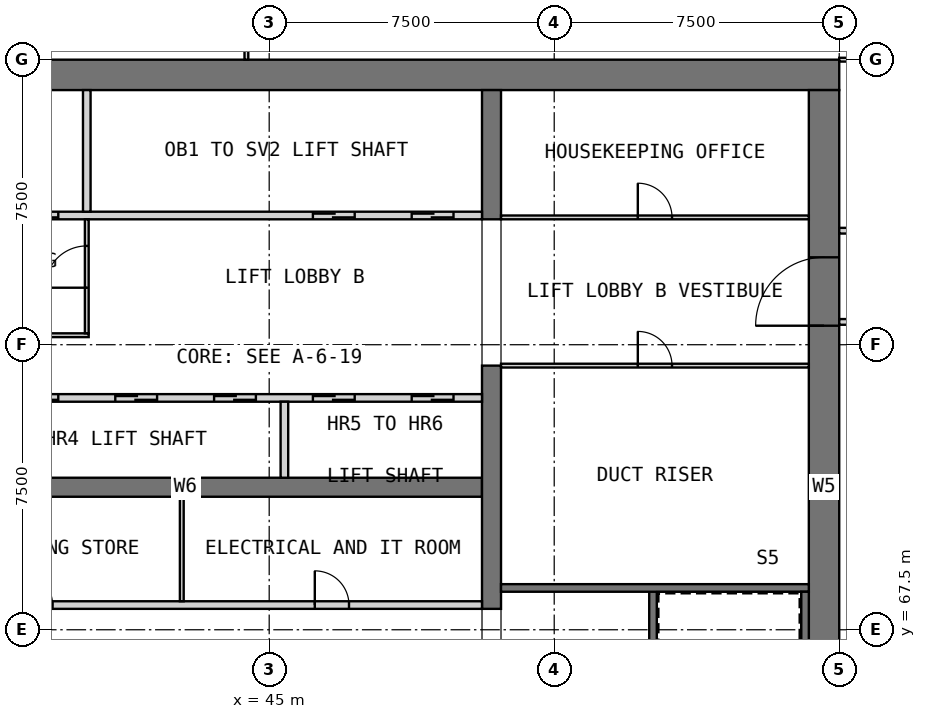
"""IFC4 building model, lengths in metres.
Left out: names, types, materials, properties, quantities, classifications, styles, units other than length and angle.
Written with IfcOpenShell. Run it as: python <this file> out.ifc"""

import sys

from ifc_helpers import new_model, si_unit, direction, frame, frame_2d, origin, place, context, subcontext, project, spatial, rectangle, extrude, element, fill, save


model = new_model("IFC4")
c1 = context("Model", 3, precision=1e-05, world=origin(), true_north=direction((0.0, 1.0)))
c2 = subcontext(c1, "Body", "Model", "MODEL_VIEW")
j1 = project(units=[si_unit("LENGTHUNIT", "METRE"), si_unit("PLANEANGLEUNIT", "RADIAN")], contexts=[c1])
p1 = place(None, origin())
s1 = spatial("IfcSite", under=j1, at=p1, CompositionType="ELEMENT")
p2 = place(p1, origin())
s2 = spatial("IfcBuilding", under=s1, at=p2, CompositionType="ELEMENT")
p3 = place(p2, frame((0.0, 0.0, 137.4)))
s3 = spatial("IfcBuildingStorey", under=s2, at=p3, CompositionType="ELEMENT", Elevation=137.4)
p4 = place(p3, frame((30.0, 82.1, 0.0), z_axis=(0.0, 0.0, 1.0), x_axis=(1.0, 0.0, 0.0)))
e1 = element("IfcWall", 1, at=p4, inside=s3, PredefinedType="SHEAR", context=c2, shape_type="SweptSolid", body=[
    extrude(rectangle(XDim=30.0, YDim=0.8, at=frame_2d((15.0, 0.0))), origin(), (0.0, 0.0, 1.0), 3.6),
])
p5 = place(p3, frame((59.6, 60.8, 0.0), z_axis=(0.0, 0.0, 1.0), x_axis=(0.0, 1.0, 0.0)))
e2 = element("IfcWall", 2, at=p5, inside=s3, PredefinedType="SHEAR", context=c2, shape_type="SweptSolid", body=[
    extrude(rectangle(XDim=20.9, YDim=0.8, at=frame_2d((10.45, 0.0))), origin(), (0.0, 0.0, 1.0), 3.6),
])
p6 = place(p5, frame((14.7, 0.0, 0.0)))
e3 = element("IfcOpeningElement", 3, at=p6, cuts=e2, PredefinedType="OPENING", context=c2, shape_type="SweptSolid", body=[
    extrude(rectangle(XDim=1.8, YDim=2.1, at=frame_2d((0.9, 1.05))), frame((0.0, 0.41, 0.0), z_axis=(0.0, -1.0, 0.0), x_axis=(1.0, 0.0, 0.0)), (0.0, 0.0, 1.0), 0.82),
])
p7 = place(p3, frame((35.0, 71.25, 0.0), z_axis=(0.0, 0.0, 1.0), x_axis=(1.0, 0.0, 0.0)))
e4 = element("IfcWall", 4, at=p7, inside=s3, PredefinedType="SHEAR", context=c2, shape_type="SweptSolid", body=[
    extrude(rectangle(XDim=15.6, YDim=0.5, at=frame_2d((7.8, 0.0))), origin(), (0.0, 0.0, 1.0), 3.6),
])
p8 = place(p3, frame((50.85, 68.05, 0.0), z_axis=(0.0, 0.0, 1.0), x_axis=(0.0, 1.0, 0.0)))
e5 = element("IfcWall", 5, at=p8, inside=s3, PredefinedType="SHEAR", context=c2, shape_type="SweptSolid", body=[
    extrude(rectangle(XDim=6.4, YDim=0.5, at=frame_2d((3.2, 0.0))), origin(), (0.0, 0.0, 1.0), 3.6),
])
p9 = place(p3, frame((50.85, 78.3, 0.0), z_axis=(0.0, 0.0, 1.0), x_axis=(0.0, 1.0, 0.0)))
e6 = element("IfcWall", 6, at=p9, inside=s3, PredefinedType="SHEAR", context=c2, shape_type="SweptSolid", body=[
    extrude(rectangle(XDim=3.4, YDim=0.5, at=frame_2d((1.7, 0.0))), origin(), (0.0, 0.0, 1.0), 3.6),
])
p10 = place(p3, frame((35.0, 68.15, 0.0), z_axis=(0.0, 0.0, 1.0), x_axis=(1.0, 0.0, 0.0)))
e7 = element("IfcWall", 7, at=p10, inside=s3, PredefinedType="PARTITIONING", context=c2, shape_type="SweptSolid", body=[
    extrude(rectangle(XDim=15.6, YDim=0.2, at=frame_2d((7.8, 0.0))), origin(), (0.0, 0.0, 1.0), 3.35),
])
p11 = place(p10, frame((3.4, 0.0, 0.0)))
e8 = element("IfcOpeningElement", 8, at=p11, cuts=e7, PredefinedType="OPENING", context=c2, shape_type="SweptSolid", body=[
    extrude(rectangle(XDim=0.9, YDim=2.1, at=frame_2d((0.45, 1.05))), frame((0.0, 0.11, 0.0), z_axis=(0.0, -1.0, 0.0), x_axis=(1.0, 0.0, 0.0)), (0.0, 0.0, 1.0), 0.22),
])
p12 = place(p10, frame((11.2, 0.0, 0.0)))
e9 = element("IfcOpeningElement", 9, at=p12, cuts=e7, PredefinedType="OPENING", context=c2, shape_type="SweptSolid", body=[
    extrude(rectangle(XDim=0.9, YDim=2.1, at=frame_2d((0.45, 1.05))), frame((0.0, 0.11, 0.0), z_axis=(0.0, -1.0, 0.0), x_axis=(1.0, 0.0, 0.0)), (0.0, 0.0, 1.0), 0.22),
])
p13 = place(p3, frame((42.7, 68.25, 0.0), z_axis=(0.0, 0.0, 1.0), x_axis=(0.0, 1.0, 0.0)))
e10 = element("IfcWall", 10, at=p13, inside=s3, PredefinedType="PARTITIONING", context=c2, shape_type="SweptSolid", body=[
    extrude(rectangle(XDim=2.75, YDim=0.1, at=frame_2d((1.375, 0.0))), origin(), (0.0, 0.0, 1.0), 3.35),
])
p14 = place(p3, frame((35.0, 73.6, 0.0), z_axis=(0.0, 0.0, 1.0), x_axis=(1.0, 0.0, 0.0)))
e11 = element("IfcWall", 11, at=p14, inside=s3, PredefinedType="SOLIDWALL", context=c2, shape_type="SweptSolid", body=[
    extrude(rectangle(XDim=15.6, YDim=0.2, at=frame_2d((7.8, 0.0))), origin(), (0.0, 0.0, 1.0), 3.6),
])
p15 = place(p14, frame((0.75, 0.0, 0.0)))
e12 = element("IfcOpeningElement", 12, at=p15, cuts=e11, PredefinedType="OPENING", context=c2, shape_type="SweptSolid", body=[
    extrude(rectangle(XDim=1.1, YDim=2.1, at=frame_2d((0.55, 1.05))), frame((0.0, 0.11, 0.0), z_axis=(0.0, -1.0, 0.0), x_axis=(1.0, 0.0, 0.0)), (0.0, 0.0, 1.0), 0.22),
])
p16 = place(p14, frame((3.35, 0.0, 0.0)))
e13 = element("IfcOpeningElement", 13, at=p16, cuts=e11, PredefinedType="OPENING", context=c2, shape_type="SweptSolid", body=[
    extrude(rectangle(XDim=1.1, YDim=2.1, at=frame_2d((0.55, 1.05))), frame((0.0, 0.11, 0.0), z_axis=(0.0, -1.0, 0.0), x_axis=(1.0, 0.0, 0.0)), (0.0, 0.0, 1.0), 0.22),
])
p17 = place(p14, frame((5.95, 0.0, 0.0)))
e14 = element("IfcOpeningElement", 14, at=p17, cuts=e11, PredefinedType="OPENING", context=c2, shape_type="SweptSolid", body=[
    extrude(rectangle(XDim=1.1, YDim=2.1, at=frame_2d((0.55, 1.05))), frame((0.0, 0.11, 0.0), z_axis=(0.0, -1.0, 0.0), x_axis=(1.0, 0.0, 0.0)), (0.0, 0.0, 1.0), 0.22),
])
p18 = place(p14, frame((8.55, 0.0, 0.0)))
e15 = element("IfcOpeningElement", 15, at=p18, cuts=e11, PredefinedType="OPENING", context=c2, shape_type="SweptSolid", body=[
    extrude(rectangle(XDim=1.1, YDim=2.1, at=frame_2d((0.55, 1.05))), frame((0.0, 0.11, 0.0), z_axis=(0.0, -1.0, 0.0), x_axis=(1.0, 0.0, 0.0)), (0.0, 0.0, 1.0), 0.22),
])
p19 = place(p14, frame((11.15, 0.0, 0.0)))
e16 = element("IfcOpeningElement", 16, at=p19, cuts=e11, PredefinedType="OPENING", context=c2, shape_type="SweptSolid", body=[
    extrude(rectangle(XDim=1.1, YDim=2.1, at=frame_2d((0.55, 1.05))), frame((0.0, 0.11, 0.0), z_axis=(0.0, -1.0, 0.0), x_axis=(1.0, 0.0, 0.0)), (0.0, 0.0, 1.0), 0.22),
])
p20 = place(p14, frame((13.75, 0.0, 0.0)))
e17 = element("IfcOpeningElement", 17, at=p20, cuts=e11, PredefinedType="OPENING", context=c2, shape_type="SweptSolid", body=[
    extrude(rectangle(XDim=1.1, YDim=2.1, at=frame_2d((0.55, 1.05))), frame((0.0, 0.11, 0.0), z_axis=(0.0, -1.0, 0.0), x_axis=(1.0, 0.0, 0.0)), (0.0, 0.0, 1.0), 0.22),
])
p21 = place(p3, frame((45.4, 71.5, 0.0), z_axis=(0.0, 0.0, 1.0), x_axis=(0.0, 1.0, 0.0)))
e18 = element("IfcWall", 18, at=p21, inside=s3, PredefinedType="SOLIDWALL", context=c2, shape_type="SweptSolid", body=[
    extrude(rectangle(XDim=2.0, YDim=0.2, at=frame_2d((1.0, 0.0))), origin(), (0.0, 0.0, 1.0), 3.6),
])
p22 = place(p3, frame((35.0, 78.4, 0.0), z_axis=(0.0, 0.0, 1.0), x_axis=(1.0, 0.0, 0.0)))
e19 = element("IfcWall", 19, at=p22, inside=s3, PredefinedType="SOLIDWALL", context=c2, shape_type="SweptSolid", body=[
    extrude(rectangle(XDim=15.6, YDim=0.2, at=frame_2d((7.8, 0.0))), origin(), (0.0, 0.0, 1.0), 3.6),
])
p23 = place(p22, frame((0.75, 0.0, 0.0)))
e20 = element("IfcOpeningElement", 20, at=p23, cuts=e19, PredefinedType="OPENING", context=c2, shape_type="SweptSolid", body=[
    extrude(rectangle(XDim=1.1, YDim=2.1, at=frame_2d((0.55, 1.05))), frame((0.0, 0.11, 0.0), z_axis=(0.0, -1.0, 0.0), x_axis=(1.0, 0.0, 0.0)), (0.0, 0.0, 1.0), 0.22),
])
p24 = place(p22, frame((3.35, 0.0, 0.0)))
e21 = element("IfcOpeningElement", 21, at=p24, cuts=e19, PredefinedType="OPENING", context=c2, shape_type="SweptSolid", body=[
    extrude(rectangle(XDim=1.1, YDim=2.1, at=frame_2d((0.55, 1.05))), frame((0.0, 0.11, 0.0), z_axis=(0.0, -1.0, 0.0), x_axis=(1.0, 0.0, 0.0)), (0.0, 0.0, 1.0), 0.22),
])
p25 = place(p22, frame((11.15, 0.0, 0.0)))
e22 = element("IfcOpeningElement", 22, at=p25, cuts=e19, PredefinedType="OPENING", context=c2, shape_type="SweptSolid", body=[
    extrude(rectangle(XDim=1.1, YDim=2.1, at=frame_2d((0.55, 1.05))), frame((0.0, 0.11, 0.0), z_axis=(0.0, -1.0, 0.0), x_axis=(1.0, 0.0, 0.0)), (0.0, 0.0, 1.0), 0.22),
])
p26 = place(p22, frame((13.75, 0.0, 0.0)))
e23 = element("IfcOpeningElement", 23, at=p26, cuts=e19, PredefinedType="OPENING", context=c2, shape_type="SweptSolid", body=[
    extrude(rectangle(XDim=1.1, YDim=2.1, at=frame_2d((0.55, 1.05))), frame((0.0, 0.11, 0.0), z_axis=(0.0, -1.0, 0.0), x_axis=(1.0, 0.0, 0.0)), (0.0, 0.0, 1.0), 0.22),
])
p27 = place(p3, frame((40.2, 78.5, 0.0), z_axis=(0.0, 0.0, 1.0), x_axis=(0.0, 1.0, 0.0)))
e24 = element("IfcWall", 24, at=p27, inside=s3, PredefinedType="SOLIDWALL", context=c2, shape_type="SweptSolid", body=[
    extrude(rectangle(XDim=3.2, YDim=0.2, at=frame_2d((1.6, 0.0))), origin(), (0.0, 0.0, 1.0), 3.6),
])
p28 = place(p3, frame((35.0, 75.25, 0.0), z_axis=(0.0, 0.0, 1.0), x_axis=(1.0, 0.0, 0.0)))
e25 = element("IfcWall", 25, at=p28, inside=s3, PredefinedType="PARTITIONING", context=c2, shape_type="SweptSolid", body=[
    extrude(rectangle(XDim=5.25, YDim=0.1, at=frame_2d((2.625, 0.0))), origin(), (0.0, 0.0, 1.0), 3.35),
])
p29 = place(p3, frame((40.2, 75.3, 0.0), z_axis=(0.0, 0.0, 1.0), x_axis=(0.0, 1.0, 0.0)))
e26 = element("IfcWall", 26, at=p29, inside=s3, PredefinedType="PARTITIONING", context=c2, shape_type="SweptSolid", body=[
    extrude(rectangle(XDim=3.0, YDim=0.1, at=frame_2d((1.5, 0.0))), origin(), (0.0, 0.0, 1.0), 3.35),
])
p30 = place(p29, frame((1.2, 0.0, 0.0)))
e27 = element("IfcOpeningElement", 27, at=p30, cuts=e26, PredefinedType="OPENING", context=c2, shape_type="SweptSolid", body=[
    extrude(rectangle(XDim=1.1, YDim=2.1, at=frame_2d((0.55, 1.05))), frame((0.0, 0.06, 0.0), z_axis=(0.0, -1.0, 0.0), x_axis=(1.0, 0.0, 0.0)), (0.0, 0.0, 1.0), 0.12),
])
p31 = place(p3, frame((55.1, 60.8, 0.0), z_axis=(0.0, 0.0, 1.0), x_axis=(0.0, 1.0, 0.0)))
e28 = element("IfcWall", 28, at=p31, inside=s3, PredefinedType="SOLIDWALL", context=c2, shape_type="SweptSolid", body=[
    extrude(rectangle(XDim=7.8, YDim=0.2, at=frame_2d((3.9, 0.0))), origin(), (0.0, 0.0, 1.0), 3.35),
])
p32 = place(p3, frame((51.1, 68.6, 0.0), z_axis=(0.0, 0.0, 1.0), x_axis=(1.0, 0.0, 0.0)))
e29 = element("IfcWall", 29, at=p32, inside=s3, PredefinedType="SOLIDWALL", context=c2, shape_type="SweptSolid", body=[
    extrude(rectangle(XDim=8.1, YDim=0.2, at=frame_2d((4.05, 0.0))), origin(), (0.0, 0.0, 1.0), 3.35),
])
p33 = place(p3, frame((59.1, 60.8, 0.0), z_axis=(0.0, 0.0, 1.0), x_axis=(0.0, 1.0, 0.0)))
e30 = element("IfcWall", 30, at=p33, inside=s3, PredefinedType="SOLIDWALL", context=c2, shape_type="SweptSolid", body=[
    extrude(rectangle(XDim=7.7, YDim=0.2, at=frame_2d((3.85, 0.0))), origin(), (0.0, 0.0, 1.0), 3.35),
])
p34 = place(p3, frame((51.1, 74.45, 0.0), z_axis=(0.0, 0.0, 1.0), x_axis=(1.0, 0.0, 0.0)))
e31 = element("IfcWall", 31, at=p34, inside=s3, PredefinedType="PARTITIONING", context=c2, shape_type="SweptSolid", body=[
    extrude(rectangle(XDim=8.1, YDim=0.1, at=frame_2d((4.05, 0.0))), origin(), (0.0, 0.0, 1.0), 3.35),
])
p35 = place(p34, frame((3.6, 0.0, 0.0)))
e32 = element("IfcOpeningElement", 32, at=p35, cuts=e31, PredefinedType="OPENING", context=c2, shape_type="SweptSolid", body=[
    extrude(rectangle(XDim=0.9, YDim=2.1, at=frame_2d((0.45, 1.05))), frame((0.0, 0.06, 0.0), z_axis=(0.0, -1.0, 0.0), x_axis=(1.0, 0.0, 0.0)), (0.0, 0.0, 1.0), 0.12),
])
p36 = place(p3, frame((51.1, 78.35, 0.0), z_axis=(0.0, 0.0, 1.0), x_axis=(1.0, 0.0, 0.0)))
e33 = element("IfcWall", 33, at=p36, inside=s3, PredefinedType="PARTITIONING", context=c2, shape_type="SweptSolid", body=[
    extrude(rectangle(XDim=8.1, YDim=0.1, at=frame_2d((4.05, 0.0))), origin(), (0.0, 0.0, 1.0), 3.35),
])
p37 = place(p36, frame((3.6, 0.0, 0.0)))
e34 = element("IfcOpeningElement", 34, at=p37, cuts=e33, PredefinedType="OPENING", context=c2, shape_type="SweptSolid", body=[
    extrude(rectangle(XDim=0.9, YDim=2.1, at=frame_2d((0.45, 1.05))), frame((0.0, 0.06, 0.0), z_axis=(0.0, -1.0, 0.0), x_axis=(1.0, 0.0, 0.0)), (0.0, 0.0, 1.0), 0.12),
])
p38 = place(p3, frame((60.0, 82.5, 0.0), z_axis=(0.0, 0.0, 1.0), x_axis=(1.0, 0.0, 0.0)))
e35 = element("IfcWall", 35, at=p38, inside=s3, PredefinedType="PARTITIONING", context=c2, shape_type="SweptSolid", body=[
    extrude(rectangle(XDim=11.175, YDim=0.1, at=frame_2d((5.587, 0.0))), origin(), (0.0, 0.0, 1.0), 3.35),
])
p39 = place(p3, frame((44.4, 82.5, 0.0), z_axis=(0.0, 0.0, 1.0), x_axis=(0.0, 1.0, 0.0)))
e36 = element("IfcWall", 36, at=p39, inside=s3, PredefinedType="PARTITIONING", context=c2, shape_type="SweptSolid", body=[
    extrude(rectangle(XDim=3.675, YDim=0.1, at=frame_2d((1.837, 0.0))), origin(), (0.0, 0.0, 1.0), 3.35),
])
for number, where, z_axis, x_axis in (
    (37, (60.0, 75.6, 0.0), (0.0, 0.0, 1.0), (1.0, 0.0, 0.0)),
    (38, (60.0, 78.0, 0.0), (0.0, 0.0, 1.0), (1.0, 0.0, 0.0)),
):
    element("IfcWall", number, at=place(p3, frame(where, z_axis=z_axis, x_axis=x_axis)), inside=s3, PredefinedType="PARTITIONING", context=c2, shape_type="SweptSolid", body=[
        extrude(rectangle(XDim=11.25, YDim=0.15, at=frame_2d((5.625, 0.0))), origin(), (0.0, 0.0, 1.0), 3.35),
    ])
p40 = place(p12, origin())
e39 = element("IfcDoor", 39, at=p40, inside=s3, OperationType="SINGLE_SWING_RIGHT", PredefinedType="DOOR", context=c2, shape_type="SweptSolid", body=[
    extrude(rectangle(XDim=0.9, YDim=2.1, at=frame_2d((0.45, 1.05))), frame((0.0, 0.025, 0.0), z_axis=(0.0, -1.0, 0.0), x_axis=(1.0, 0.0, 0.0)), (0.0, 0.0, 1.0), 0.05),
])
fill(e9, e39)
p41 = place(p16, origin())
e40 = element("IfcDoor", 40, at=p41, inside=s3, OperationType="DOUBLE_DOOR_SLIDING", PredefinedType="DOOR", context=c2, shape_type="SweptSolid", body=[
    extrude(rectangle(XDim=1.1, YDim=2.1, at=frame_2d((0.55, 1.05))), frame((0.0, 0.025, 0.0), z_axis=(0.0, -1.0, 0.0), x_axis=(1.0, 0.0, 0.0)), (0.0, 0.0, 1.0), 0.05),
])
fill(e13, e40)
p42 = place(p17, origin())
e41 = element("IfcDoor", 41, at=p42, inside=s3, OperationType="DOUBLE_DOOR_SLIDING", PredefinedType="DOOR", context=c2, shape_type="SweptSolid", body=[
    extrude(rectangle(XDim=1.1, YDim=2.1, at=frame_2d((0.55, 1.05))), frame((0.0, 0.025, 0.0), z_axis=(0.0, -1.0, 0.0), x_axis=(1.0, 0.0, 0.0)), (0.0, 0.0, 1.0), 0.05),
])
fill(e14, e41)
p43 = place(p18, origin())
e42 = element("IfcDoor", 42, at=p43, inside=s3, OperationType="DOUBLE_DOOR_SLIDING", PredefinedType="DOOR", context=c2, shape_type="SweptSolid", body=[
    extrude(rectangle(XDim=1.1, YDim=2.1, at=frame_2d((0.55, 1.05))), frame((0.0, 0.025, 0.0), z_axis=(0.0, -1.0, 0.0), x_axis=(1.0, 0.0, 0.0)), (0.0, 0.0, 1.0), 0.05),
])
fill(e15, e42)
p44 = place(p19, origin())
e43 = element("IfcDoor", 43, at=p44, inside=s3, OperationType="DOUBLE_DOOR_SLIDING", PredefinedType="DOOR", context=c2, shape_type="SweptSolid", body=[
    extrude(rectangle(XDim=1.1, YDim=2.1, at=frame_2d((0.55, 1.05))), frame((0.0, 0.025, 0.0), z_axis=(0.0, -1.0, 0.0), x_axis=(1.0, 0.0, 0.0)), (0.0, 0.0, 1.0), 0.05),
])
fill(e16, e43)
p45 = place(p20, origin())
e44 = element("IfcDoor", 44, at=p45, inside=s3, OperationType="DOUBLE_DOOR_SLIDING", PredefinedType="DOOR", context=c2, shape_type="SweptSolid", body=[
    extrude(rectangle(XDim=1.1, YDim=2.1, at=frame_2d((0.55, 1.05))), frame((0.0, 0.025, 0.0), z_axis=(0.0, -1.0, 0.0), x_axis=(1.0, 0.0, 0.0)), (0.0, 0.0, 1.0), 0.05),
])
fill(e17, e44)
p46 = place(p24, origin())
e45 = element("IfcDoor", 45, at=p46, inside=s3, OperationType="DOUBLE_DOOR_SLIDING", PredefinedType="DOOR", context=c2, shape_type="SweptSolid", body=[
    extrude(rectangle(XDim=1.1, YDim=2.1, at=frame_2d((0.55, 1.05))), frame((0.0, 0.025, 0.0), z_axis=(0.0, -1.0, 0.0), x_axis=(1.0, 0.0, 0.0)), (0.0, 0.0, 1.0), 0.05),
])
fill(e21, e45)
p47 = place(p25, origin())
e46 = element("IfcDoor", 46, at=p47, inside=s3, OperationType="DOUBLE_DOOR_SLIDING", PredefinedType="DOOR", context=c2, shape_type="SweptSolid", body=[
    extrude(rectangle(XDim=1.1, YDim=2.1, at=frame_2d((0.55, 1.05))), frame((0.0, 0.025, 0.0), z_axis=(0.0, -1.0, 0.0), x_axis=(1.0, 0.0, 0.0)), (0.0, 0.0, 1.0), 0.05),
])
fill(e22, e46)
p48 = place(p26, origin())
e47 = element("IfcDoor", 47, at=p48, inside=s3, OperationType="DOUBLE_DOOR_SLIDING", PredefinedType="DOOR", context=c2, shape_type="SweptSolid", body=[
    extrude(rectangle(XDim=1.1, YDim=2.1, at=frame_2d((0.55, 1.05))), frame((0.0, 0.025, 0.0), z_axis=(0.0, -1.0, 0.0), x_axis=(1.0, 0.0, 0.0)), (0.0, 0.0, 1.0), 0.05),
])
fill(e23, e47)
p49 = place(p6, origin())
e48 = element("IfcDoor", 48, at=p49, inside=s3, OperationType="DOUBLE_DOOR_SINGLE_SWING", PredefinedType="DOOR", context=c2, shape_type="SweptSolid", body=[
    extrude(rectangle(XDim=1.8, YDim=2.1, at=frame_2d((0.9, 1.05))), frame((0.0, 0.025, 0.0), z_axis=(0.0, -1.0, 0.0), x_axis=(1.0, 0.0, 0.0)), (0.0, 0.0, 1.0), 0.05),
])
fill(e3, e48)
p50 = place(p30, origin())
e49 = element("IfcDoor", 49, at=p50, inside=s3, OperationType="SINGLE_SWING_LEFT", PredefinedType="DOOR", context=c2, shape_type="SweptSolid", body=[
    extrude(rectangle(XDim=1.1, YDim=2.1, at=frame_2d((0.55, 1.05))), frame((0.0, 0.025, 0.0), z_axis=(0.0, -1.0, 0.0), x_axis=(1.0, 0.0, 0.0)), (0.0, 0.0, 1.0), 0.05),
])
fill(e27, e49)
p51 = place(p35, origin())
e50 = element("IfcDoor", 50, at=p51, inside=s3, OperationType="SINGLE_SWING_LEFT", PredefinedType="DOOR", context=c2, shape_type="SweptSolid", body=[
    extrude(rectangle(XDim=0.9, YDim=2.1, at=frame_2d((0.45, 1.05))), frame((0.0, 0.025, 0.0), z_axis=(0.0, -1.0, 0.0), x_axis=(1.0, 0.0, 0.0)), (0.0, 0.0, 1.0), 0.05),
])
fill(e32, e50)
p52 = place(p37, origin())
e51 = element("IfcDoor", 51, at=p52, inside=s3, OperationType="SINGLE_SWING_LEFT", PredefinedType="DOOR", context=c2, shape_type="SweptSolid", body=[
    extrude(rectangle(XDim=0.9, YDim=2.1, at=frame_2d((0.45, 1.05))), frame((0.0, 0.025, 0.0), z_axis=(0.0, -1.0, 0.0), x_axis=(1.0, 0.0, 0.0)), (0.0, 0.0, 1.0), 0.05),
])
fill(e34, e51)
save(model, sys.argv[1])
